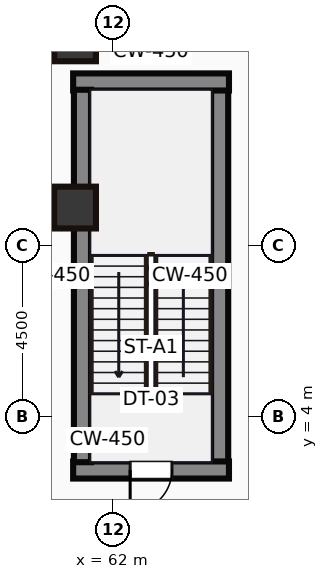
"""IFC4 building model, lengths in metres.
Left out: names, types, materials, properties, quantities, classifications, styles, units other than length and angle.
Written with IfcOpenShell. Run it as: python <this file> out.ifc"""

import sys

from ifc_helpers import new_model, si_unit, direction, frame, frame_2d, origin, origin_2d, place, context, subcontext, project, spatial, rectangle, hollow_rectangle, extrude, source, transform, mapped, element, fill, save


model = new_model("IFC4")
c1 = context("Model", 3, precision=1e-05, world=origin(), true_north=direction((0.0, 1.0)))
c2 = subcontext(c1, "Body", "Model", "MODEL_VIEW")
j1 = project(units=[si_unit("LENGTHUNIT", "METRE"), si_unit("PLANEANGLEUNIT", "RADIAN")], contexts=[c1])
p1 = place(None, origin())
s1 = spatial("IfcSite", under=j1, at=p1, CompositionType="ELEMENT")
p2 = place(p1, origin())
s2 = spatial("IfcBuilding", under=s1, at=p2, CompositionType="ELEMENT")
p3 = place(p2, frame((0.0, 0.0, 21.0)))
s3 = spatial("IfcBuildingStorey", under=s2, at=p3, CompositionType="ELEMENT", Elevation=21.0)
m1 = source(origin(), c2, "Body", "SweptSolid", [
    extrude(hollow_rectangle(XDim=1.1, YDim=1.3, WallThickness=0.055, at=origin_2d()), origin(), (0.0, 0.0, 1.0), 5.0),
])
p4 = place(p3, frame((61.0, 14.0, 0.0), z_axis=(0.0, 0.0, 1.0), x_axis=(1.0, 0.0, 0.0)))
e1 = element("IfcColumn", 1, at=p4, inside=s3, PredefinedType="PILASTER", context=c2, shape_type="MappedRepresentation", body=[
    mapped(m1, transform((0.0, 0.0, 0.0))),
])
m2 = source(origin(), c2, "Body", "SweptSolid", [
    extrude(hollow_rectangle(XDim=1.1, YDim=1.1, WallThickness=0.05, at=origin_2d()), origin(), (0.0, 0.0, 1.0), 5.0),
])
p5 = place(p3, frame((61.0, 9.5, 0.0), z_axis=(0.0, 0.0, 1.0), x_axis=(1.0, 0.0, 0.0)))
e2 = element("IfcColumn", 2, at=p5, inside=s3, PredefinedType="PILASTER", context=c2, shape_type="MappedRepresentation", body=[
    mapped(m2, transform((0.0, 0.0, 0.0))),
])
m3 = source(origin(), c2, "Body", "SweptSolid", [
    extrude(rectangle(XDim=4.1, YDim=0.45, at=frame_2d((2.05, 0.0))), origin(), (0.0, 0.0, 1.0), 5.0),
])
p6 = place(p3, frame((60.95, 2.595, 0.0), z_axis=(0.0, 0.0, 1.0), x_axis=(1.0, 0.0, 0.0)))
e3 = element("IfcWall", 3, at=p6, inside=s3, PredefinedType="SHEAR", context=c2, shape_type="MappedRepresentation", body=[
    mapped(m3, transform((0.0, 0.0, 0.0))),
])
p7 = place(p6, frame((1.5, 0.0, 0.0)))
e4 = element("IfcOpeningElement", 4, at=p7, cuts=e3, PredefinedType="OPENING", context=c2, shape_type="SweptSolid", body=[
    extrude(rectangle(XDim=1.1, YDim=2.15, at=frame_2d((0.55, 1.075))), frame((0.0, 0.235, 0.0), z_axis=(0.0, -1.0, 0.0), x_axis=(1.0, 0.0, 0.0)), (0.0, 0.0, 1.0), 0.47),
])
m4 = source(origin(), c2, "Body", "SweptSolid", [
    extrude(rectangle(XDim=9.8, YDim=0.45, at=frame_2d((4.9, 0.0))), origin(), (0.0, 0.0, 1.0), 5.0),
])
for number, where, z_axis, x_axis in (
    (5, (61.195, 2.8, 0.0), (0.0, 0.0, 1.0), (0.0, 1.0, 0.0)),
    (6, (64.805, 2.8, 0.0), (0.0, 0.0, 1.0), (0.0, 1.0, 0.0)),
):
    element("IfcWall", number, at=place(p3, frame(where, z_axis=z_axis, x_axis=x_axis)), inside=s3, PredefinedType="SHEAR", context=c2, shape_type="MappedRepresentation", body=[
        mapped(m4, transform((0.0, 0.0, 0.0))),
    ])
p8 = place(p3, frame((60.95, 12.805, 0.0), z_axis=(0.0, 0.0, 1.0), x_axis=(1.0, 0.0, 0.0)))
e7 = element("IfcWall", 7, at=p8, inside=s3, PredefinedType="SHEAR", context=c2, shape_type="MappedRepresentation", body=[
    mapped(m3, transform((0.0, 0.0, 0.0))),
])
m5 = source(origin(), c2, "Body", "SweptSolid", [
    extrude(rectangle(XDim=1.1, YDim=2.15, at=frame_2d((0.55, 1.075))), frame((0.0, 0.025, 0.0), z_axis=(0.0, -1.0, 0.0), x_axis=(1.0, 0.0, 0.0)), (0.0, 0.0, 1.0), 0.05),
])
p9 = place(p7, origin())
e8 = element("IfcDoor", 8, at=p9, inside=s3, OperationType="SINGLE_SWING_LEFT", PredefinedType="DOOR", context=c2, shape_type="MappedRepresentation", body=[
    mapped(m5, transform((0.0, 0.0, 0.0))),
])
fill(e4, e8)
save(model, sys.argv[1])
